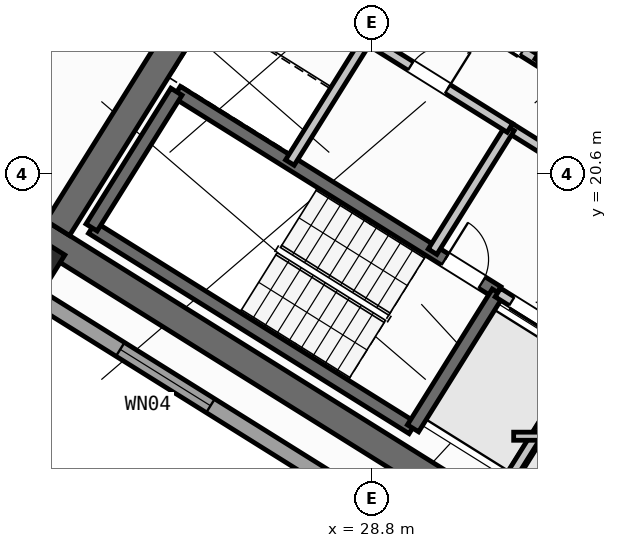
"""IFC4 building model, lengths in metres.
Left out: names, types, materials, properties, quantities, classifications, styles, units other than length and angle.
Written with IfcOpenShell. Run it as: python <this file> out.ifc"""

import sys

from ifc_helpers import new_model, si_unit, direction, frame, frame_2d, origin, origin_2d, place, context, subcontext, project, spatial, rectangle, hollow_rectangle, extrude, source, transform, mapped, element, fill, save


model = new_model("IFC4")
c1 = context("Model", 3, precision=1e-05, world=origin(), true_north=direction((0.0, 1.0)))
c2 = subcontext(c1, "Body", "Model", "MODEL_VIEW")
j1 = project(units=[si_unit("LENGTHUNIT", "METRE"), si_unit("PLANEANGLEUNIT", "RADIAN")], contexts=[c1])
p1 = place(None, origin())
s1 = spatial("IfcSite", under=j1, at=p1, CompositionType="ELEMENT")
p2 = place(p1, origin())
s2 = spatial("IfcBuilding", under=s1, at=p2, CompositionType="ELEMENT")
p3 = place(p2, frame((0.0, 0.0, 184.2)))
s3 = spatial("IfcBuildingStorey", under=s2, at=p3, CompositionType="ELEMENT", Elevation=184.2)
p4 = place(p3, frame((33.366, 12.477, 0.0), z_axis=(0.0, 0.0, 1.0), x_axis=(-0.848047359947, 0.529920442413, 0.0)))
e1 = element("IfcWall", 1, at=p4, inside=s3, PredefinedType="SHEAR", context=c2, shape_type="SweptSolid", body=[
    extrude(rectangle(XDim=13.14, YDim=0.55, at=frame_2d((6.57, 0.0))), origin(), (0.0, 0.0, 1.0), 3.35),
])
p5 = place(p3, frame((26.007, 24.976, 0.0), z_axis=(0.0, 0.0, 1.0), x_axis=(-0.529923795287, -0.848045264823, 0.0)))
e2 = element("IfcWall", 2, at=p5, inside=s3, PredefinedType="SHEAR", context=c2, shape_type="SweptSolid", body=[
    extrude(rectangle(XDim=6.425, YDim=0.55, at=frame_2d((3.212, 0.0))), origin(), (0.0, 0.0, 1.0), 3.35),
])
m1 = source(origin(), c2, "Body", "SweptSolid", [
    extrude(hollow_rectangle(XDim=0.8, YDim=0.8, WallThickness=0.032, at=origin_2d()), origin(), (0.0, 0.0, 1.0), 3.6),
])
p6 = place(p3, frame((22.191, 18.87, 0.0), z_axis=(0.0, 0.0, 1.0), x_axis=(-0.848048096156, 0.529919264233, 0.0)))
e3 = element("IfcColumn", 3, at=p6, inside=s3, PredefinedType="COLUMN", context=c2, shape_type="MappedRepresentation", body=[
    mapped(m1, transform((0.0, 0.0, 0.0), scale=1.0)),
])
p7 = place(p3, frame((31.76, 12.183, 0.0), z_axis=(0.0, 0.0, 1.0), x_axis=(-0.848047074256, 0.529920899612, 0.0)))
e4 = element("IfcWall", 4, at=p7, inside=s3, PredefinedType="STANDARD", context=c2, shape_type="SweptSolid", body=[
    extrude(rectangle(XDim=30.652, YDim=0.32, at=frame_2d((15.326, 0.0))), origin(), (0.0, 0.0, 1.0), 3.35),
])
p8 = place(p7, frame((15.166, 0.0, 0.0)))
e5 = element("IfcOpeningElement", 5, at=p8, cuts=e4, PredefinedType="OPENING", context=c2, shape_type="SweptSolid", body=[
    extrude(rectangle(XDim=1.2, YDim=2.15, at=frame_2d((0.6, 1.075))), frame((0.0, 0.17, 0.0), z_axis=(0.0, -1.0, 0.0), x_axis=(1.0, 0.0, 0.0)), (0.0, 0.0, 1.0), 0.34),
])
p9 = place(p7, frame((2.015, 0.0, 0.8)))
e6 = element("IfcOpeningElement", 6, at=p9, cuts=e4, PredefinedType="OPENING", context=c2, shape_type="SweptSolid", body=[
    extrude(rectangle(XDim=2.1, YDim=1.55, at=frame_2d((1.05, 0.775))), frame((0.0, 0.17, 0.0), z_axis=(0.0, -1.0, 0.0), x_axis=(1.0, 0.0, 0.0)), (0.0, 0.0, 1.0), 0.34),
])
p10 = place(p7, frame((7.244, 0.0, 0.8)))
e7 = element("IfcOpeningElement", 7, at=p10, cuts=e4, PredefinedType="OPENING", context=c2, shape_type="SweptSolid", body=[
    extrude(rectangle(XDim=2.1, YDim=1.55, at=frame_2d((1.05, 0.775))), frame((0.0, 0.17, 0.0), z_axis=(0.0, -1.0, 0.0), x_axis=(1.0, 0.0, 0.0)), (0.0, 0.0, 1.0), 0.34),
])
p11 = place(p7, frame((12.623, 0.0, 1.0)))
e8 = element("IfcOpeningElement", 8, at=p11, cuts=e4, PredefinedType="OPENING", context=c2, shape_type="SweptSolid", body=[
    extrude(rectangle(XDim=0.9, YDim=1.25, at=frame_2d((0.45, 0.625))), frame((0.0, 0.17, 0.0), z_axis=(0.0, -1.0, 0.0), x_axis=(1.0, 0.0, 0.0)), (0.0, 0.0, 1.0), 0.34),
])
p12 = place(p7, frame((19.565, 0.0, 0.95)))
e9 = element("IfcOpeningElement", 9, at=p12, cuts=e4, PredefinedType="OPENING", context=c2, shape_type="SweptSolid", body=[
    extrude(rectangle(XDim=1.2, YDim=1.4, at=frame_2d((0.6, 0.7))), frame((0.0, 0.17, 0.0), z_axis=(0.0, -1.0, 0.0), x_axis=(1.0, 0.0, 0.0)), (0.0, 0.0, 1.0), 0.34),
])
p13 = place(p7, frame((25.983, 0.0, 1.0)))
e10 = element("IfcOpeningElement", 10, at=p13, cuts=e4, PredefinedType="OPENING", context=c2, shape_type="SweptSolid", body=[
    extrude(rectangle(XDim=0.9, YDim=1.25, at=frame_2d((0.45, 0.625))), frame((0.0, 0.17, 0.0), z_axis=(0.0, -1.0, 0.0), x_axis=(1.0, 0.0, 0.0)), (0.0, 0.0, 1.0), 0.34),
])
p14 = place(p7, frame((28.433, 0.0, 1.0)))
e11 = element("IfcOpeningElement", 11, at=p14, cuts=e4, PredefinedType="OPENING", context=c2, shape_type="SweptSolid", body=[
    extrude(rectangle(XDim=0.9, YDim=1.25, at=frame_2d((0.45, 0.625))), frame((0.0, 0.17, 0.0), z_axis=(0.0, -1.0, 0.0), x_axis=(1.0, 0.0, 0.0)), (0.0, 0.0, 1.0), 0.34),
])
p15 = place(p3, frame((29.605, 15.581, 0.0), z_axis=(0.0, 0.0, 1.0), x_axis=(-0.848036911448, 0.529937163087, 0.0)))
e12 = element("IfcWall", 12, at=p15, inside=s3, PredefinedType="SHEAR", context=c2, shape_type="SweptSolid", body=[
    extrude(rectangle(XDim=7.46, YDim=0.26, at=frame_2d((3.73, 0.0))), origin(), (0.0, 0.0, 1.0), 3.35),
])
p16 = place(p3, frame((31.28, 18.261, 0.0), z_axis=(0.0, 0.0, 1.0), x_axis=(-0.848051618787, 0.529913626805, 0.0)))
e13 = element("IfcWall", 13, at=p16, inside=s3, PredefinedType="SHEAR", context=c2, shape_type="SweptSolid", body=[
    extrude(rectangle(XDim=7.46, YDim=0.26, at=frame_2d((3.73, 0.0))), origin(), (0.0, 0.0, 1.0), 3.35),
])
p17 = place(p16, frame((0.36, 0.0, 0.0)))
e14 = element("IfcOpeningElement", 14, at=p17, cuts=e13, PredefinedType="OPENING", context=c2, shape_type="SweptSolid", body=[
    extrude(rectangle(XDim=0.86, YDim=2.05, at=frame_2d((0.43, 1.025))), frame((0.0, 0.14, 0.0), z_axis=(0.0, -1.0, 0.0), x_axis=(1.0, 0.0, 0.0)), (0.0, 0.0, 1.0), 0.28),
])
p18 = place(p3, frame((31.288, 18.256, 0.0), z_axis=(0.0, 0.0, 1.0), x_axis=(-0.529943379326, -0.848033026897, 0.0)))
e15 = element("IfcWall", 15, at=p18, inside=s3, PredefinedType="SHEAR", context=c2, shape_type="SweptSolid", body=[
    extrude(rectangle(XDim=3.16, YDim=0.26, at=frame_2d((1.58, 0.0))), origin(), (0.0, 0.0, 1.0), 3.35),
])
p19 = place(p3, frame((24.945, 22.22, 0.0), z_axis=(0.0, 0.0, 1.0), x_axis=(-0.529908658664, -0.84805472316, 0.0)))
e16 = element("IfcWall", 16, at=p19, inside=s3, PredefinedType="SHEAR", context=c2, shape_type="SweptSolid", body=[
    extrude(rectangle(XDim=3.16, YDim=0.26, at=frame_2d((1.58, 0.0))), origin(), (0.0, 0.0, 1.0), 3.35),
])
p20 = place(p3, frame((38.046, 21.108, 0.0), z_axis=(0.0, 0.0, 1.0), x_axis=(-0.848054434086, 0.529909121291, 0.0)))
e17 = element("IfcWall", 17, at=p20, inside=s3, PredefinedType="SHEAR", context=c2, shape_type="SweptSolid", body=[
    extrude(rectangle(XDim=7.33, YDim=0.26, at=frame_2d((3.665, 0.0))), origin(), (0.0, 0.0, 1.0), 3.35),
])
p21 = place(p20, frame((0.22, 0.0, 0.0)))
e18 = element("IfcOpeningElement", 18, at=p21, cuts=e17, PredefinedType="OPENING", context=c2, shape_type="SweptSolid", body=[
    extrude(rectangle(XDim=1.1, YDim=2.1, at=frame_2d((0.55, 1.05))), frame((0.0, 0.14, 0.0), z_axis=(0.0, -1.0, 0.0), x_axis=(1.0, 0.0, 0.0)), (0.0, 0.0, 1.0), 0.28),
])
p22 = place(p3, frame((34.891, 16.005, 0.0), z_axis=(0.0, 0.0, 1.0), x_axis=(-0.848062873452, 0.529895614884, 0.0)))
e19 = element("IfcWall", 19, at=p22, inside=s3, PredefinedType="STANDARD", context=c2, shape_type="SweptSolid", body=[
    extrude(rectangle(XDim=4.248, YDim=0.2, at=frame_2d((2.124, 0.0))), origin(), (0.0, 0.0, 1.0), 3.34),
])
p23 = place(p22, frame((0.398, 0.0, 0.0)))
e20 = element("IfcOpeningElement", 20, at=p23, cuts=e19, PredefinedType="OPENING", context=c2, shape_type="SweptSolid", body=[
    extrude(rectangle(XDim=1.3, YDim=2.2, at=frame_2d((0.65, 1.1))), frame((0.0, 0.11, 0.0), z_axis=(0.0, -1.0, 0.0), x_axis=(1.0, 0.0, 0.0)), (0.0, 0.0, 1.0), 0.22),
])
p24 = place(p22, frame((2.473, 0.0, 0.0)))
e21 = element("IfcOpeningElement", 21, at=p24, cuts=e19, PredefinedType="OPENING", context=c2, shape_type="SweptSolid", body=[
    extrude(rectangle(XDim=1.45, YDim=2.25, at=frame_2d((0.725, 1.125))), frame((0.0, 0.11, 0.0), z_axis=(0.0, -1.0, 0.0), x_axis=(1.0, 0.0, 0.0)), (0.0, 0.0, 1.0), 0.22),
])
p25 = place(p3, frame((36.417, 18.447, 0.0), z_axis=(0.0, 0.0, 1.0), x_axis=(-0.848064879198, 0.529892404805, 0.0)))
e22 = element("IfcWall", 22, at=p25, inside=s3, PredefinedType="STANDARD", context=c2, shape_type="SweptSolid", body=[
    extrude(rectangle(XDim=5.768, YDim=0.2, at=frame_2d((2.884, 0.0))), origin(), (0.0, 0.0, 1.0), 3.34),
])
p26 = place(p25, frame((2.548, 0.0, 0.0)))
e23 = element("IfcOpeningElement", 23, at=p26, cuts=e22, PredefinedType="OPENING", context=c2, shape_type="SweptSolid", body=[
    extrude(rectangle(XDim=1.15, YDim=2.1, at=frame_2d((0.575, 1.05))), frame((0.0, 0.11, 0.0), z_axis=(0.0, -1.0, 0.0), x_axis=(1.0, 0.0, 0.0)), (0.0, 0.0, 1.0), 0.22),
])
p27 = place(p3, frame((32.108, 22.814, 0.0), z_axis=(0.0, 0.0, 1.0), x_axis=(-0.848042229521, 0.529928652696, 0.0)))
e24 = element("IfcWall", 24, at=p27, inside=s3, PredefinedType="STANDARD", context=c2, shape_type="SweptSolid", body=[
    extrude(rectangle(XDim=5.62, YDim=0.2, at=frame_2d((2.81, 0.0))), origin(), (0.0, 0.0, 1.0), 3.34),
])
p28 = place(p27, frame((0.39, 0.0, 0.0)))
e25 = element("IfcOpeningElement", 25, at=p28, cuts=e24, PredefinedType="OPENING", context=c2, shape_type="SweptSolid", body=[
    extrude(rectangle(XDim=1.1, YDim=2.15, at=frame_2d((0.55, 1.075))), frame((0.0, 0.11, 0.0), z_axis=(0.0, -1.0, 0.0), x_axis=(1.0, 0.0, 0.0)), (0.0, 0.0, 1.0), 0.22),
])
p29 = place(p27, frame((2.25, 0.0, 0.0)))
e26 = element("IfcOpeningElement", 26, at=p29, cuts=e24, PredefinedType="OPENING", context=c2, shape_type="SweptSolid", body=[
    extrude(rectangle(XDim=1.1, YDim=2.15, at=frame_2d((0.55, 1.075))), frame((0.0, 0.11, 0.0), z_axis=(0.0, -1.0, 0.0), x_axis=(1.0, 0.0, 0.0)), (0.0, 0.0, 1.0), 0.22),
])
p30 = place(p27, frame((4.11, 0.0, 0.0)))
e27 = element("IfcOpeningElement", 27, at=p30, cuts=e24, PredefinedType="OPENING", context=c2, shape_type="SweptSolid", body=[
    extrude(rectangle(XDim=1.1, YDim=2.15, at=frame_2d((0.55, 1.075))), frame((0.0, 0.11, 0.0), z_axis=(0.0, -1.0, 0.0), x_axis=(1.0, 0.0, 0.0)), (0.0, 0.0, 1.0), 0.22),
])
p31 = place(p3, frame((32.982, 24.213, 0.0), z_axis=(0.0, 0.0, 1.0), x_axis=(-0.529839334948, -0.84809803628, 0.0)))
e28 = element("IfcWall", 28, at=p31, inside=s3, PredefinedType="STANDARD", context=c2, shape_type="SweptSolid", body=[
    extrude(rectangle(XDim=1.65, YDim=0.2, at=frame_2d((0.825, 0.0))), origin(), (0.0, 0.0, 1.0), 3.34),
])
p32 = place(p3, frame((33.029, 17.003, 0.0), z_axis=(0.0, 0.0, 1.0), x_axis=(-0.529916267533, -0.848049968695, 0.0)))
e29 = element("IfcWall", 29, at=p32, inside=s3, PredefinedType="STANDARD", context=c2, shape_type="SweptSolid", body=[
    extrude(rectangle(XDim=2.92, YDim=0.2, at=frame_2d((1.46, 0.0))), origin(), (0.0, 0.0, 1.0), 3.34),
])
for number, where, z_axis, x_axis in (
    (30, (31.525, 21.504, 0.0), (0.0, 0.0, 1.0), (-0.53, -0.848, 0.0)),
    (31, (28.71, 23.263, 0.0), (0.0, 0.0, 1.0), (-0.53, -0.848, 0.0)),
):
    element("IfcWall", number, at=place(p3, frame(where, z_axis=z_axis, x_axis=x_axis)), inside=s3, PredefinedType="STANDARD", context=c2, shape_type="SweptSolid", body=[
        extrude(rectangle(XDim=2.88, YDim=0.2, at=frame_2d((1.44, 0.0))), origin(), (0.0, 0.0, 1.0), 3.34),
    ])
p33 = place(p3, frame((31.525, 21.504, 0.0), z_axis=(0.0, 0.0, 1.0), x_axis=(-0.848040211232, 0.529931882541, 0.0)))
e32 = element("IfcWall", 32, at=p33, inside=s3, PredefinedType="STANDARD", context=c2, shape_type="SweptSolid", body=[
    extrude(rectangle(XDim=6.218, YDim=0.2, at=frame_2d((3.109, 0.0))), origin(), (0.0, 0.0, 1.0), 3.34),
])
p34 = place(p33, frame((4.4, 0.0, 0.0)))
e33 = element("IfcOpeningElement", 33, at=p34, cuts=e32, PredefinedType="OPENING", context=c2, shape_type="SweptSolid", body=[
    extrude(rectangle(XDim=0.86, YDim=2.05, at=frame_2d((0.43, 1.025))), frame((0.0, 0.11, 0.0), z_axis=(0.0, -1.0, 0.0), x_axis=(1.0, 0.0, 0.0)), (0.0, 0.0, 1.0), 0.22),
])
p35 = place(p33, frame((1.45, 0.0, 0.0)))
e34 = element("IfcOpeningElement", 34, at=p35, cuts=e32, PredefinedType="OPENING", context=c2, shape_type="SweptSolid", body=[
    extrude(rectangle(XDim=0.86, YDim=2.05, at=frame_2d((0.43, 1.025))), frame((0.0, 0.11, 0.0), z_axis=(0.0, -1.0, 0.0), x_axis=(1.0, 0.0, 0.0)), (0.0, 0.0, 1.0), 0.22),
])
p36 = place(p3, frame((24.588, 27.631, 0.0), z_axis=(0.0, 0.0, 1.0), x_axis=(-0.529914992377, -0.848050765494, 0.0)))
e35 = element("IfcWall", 35, at=p36, inside=s3, PredefinedType="PARTITIONING", context=c2, shape_type="SweptSolid", body=[
    extrude(rectangle(XDim=9.15, YDim=0.16, at=frame_2d((4.575, 0.0))), origin(), (0.0, 0.0, 1.0), 3.34),
])
p37 = place(p3, frame((31.6, 15.42, 0.0), z_axis=(0.0, 0.0, 1.0), x_axis=(1.0, 0.0, 0.0)))
e36 = element("IfcWall", 36, at=p37, inside=s3, PredefinedType="PARTITIONING", context=c2, shape_type="SweptSolid", body=[
    extrude(rectangle(XDim=2.925, YDim=0.16, at=frame_2d((1.462, 0.0))), origin(), (0.0, 0.0, 1.0), 3.34),
])
m2 = source(origin(), c2, "Body", "SweptSolid", [
    extrude(rectangle(XDim=2.1, YDim=1.55, at=frame_2d((1.05, 0.775))), frame((0.0, 0.03, 0.0), z_axis=(0.0, -1.0, 0.0), x_axis=(1.0, 0.0, 0.0)), (0.0, 0.0, 1.0), 0.06),
])
p38 = place(p10, origin())
e37 = element("IfcWindow", 37, at=p38, inside=s3, PartitioningType="SINGLE_PANEL", PredefinedType="WINDOW", context=c2, shape_type="MappedRepresentation", body=[
    mapped(m2, transform((0.0, 0.0, 0.0), scale=1.0)),
])
fill(e7, e37)
m3 = source(origin(), c2, "Body", "SweptSolid", [
    extrude(rectangle(XDim=0.86, YDim=2.05, at=frame_2d((0.43, 1.025))), frame((0.0, 0.025, 0.0), z_axis=(0.0, -1.0, 0.0), x_axis=(1.0, 0.0, 0.0)), (0.0, 0.0, 1.0), 0.05),
])
p39 = place(p17, frame((0.86, 0.0, 0.0), z_axis=(0.0, 0.0, 1.0), x_axis=(-1.0, 0.0, 0.0)))
e38 = element("IfcDoor", 38, at=p39, inside=s3, OperationType="SINGLE_SWING_LEFT", PredefinedType="DOOR", context=c2, shape_type="MappedRepresentation", body=[
    mapped(m3, transform((0.0, 0.0, 0.0), scale=1.0)),
])
fill(e14, e38)
m4 = source(origin(), c2, "Body", "SweptSolid", [
    extrude(rectangle(XDim=1.45, YDim=2.25, at=frame_2d((0.725, 1.125))), frame((0.0, 0.025, 0.0), z_axis=(0.0, -1.0, 0.0), x_axis=(1.0, 0.0, 0.0)), (0.0, 0.0, 1.0), 0.05),
])
p40 = place(p24, origin())
e39 = element("IfcDoor", 39, at=p40, inside=s3, OperationType="DOUBLE_DOOR_SLIDING", PredefinedType="DOOR", context=c2, shape_type="MappedRepresentation", body=[
    mapped(m4, transform((0.0, 0.0, 0.0), scale=1.0)),
])
fill(e21, e39)
p41 = place(p35, frame((0.86, 0.0, 0.0), z_axis=(0.0, 0.0, 1.0), x_axis=(-1.0, 0.0, 0.0)))
e40 = element("IfcDoor", 40, at=p41, inside=s3, OperationType="SINGLE_SWING_RIGHT", PredefinedType="DOOR", context=c2, shape_type="MappedRepresentation", body=[
    mapped(m3, transform((0.0, 0.0, 0.0), scale=1.0)),
])
fill(e34, e40)
save(model, sys.argv[1])
